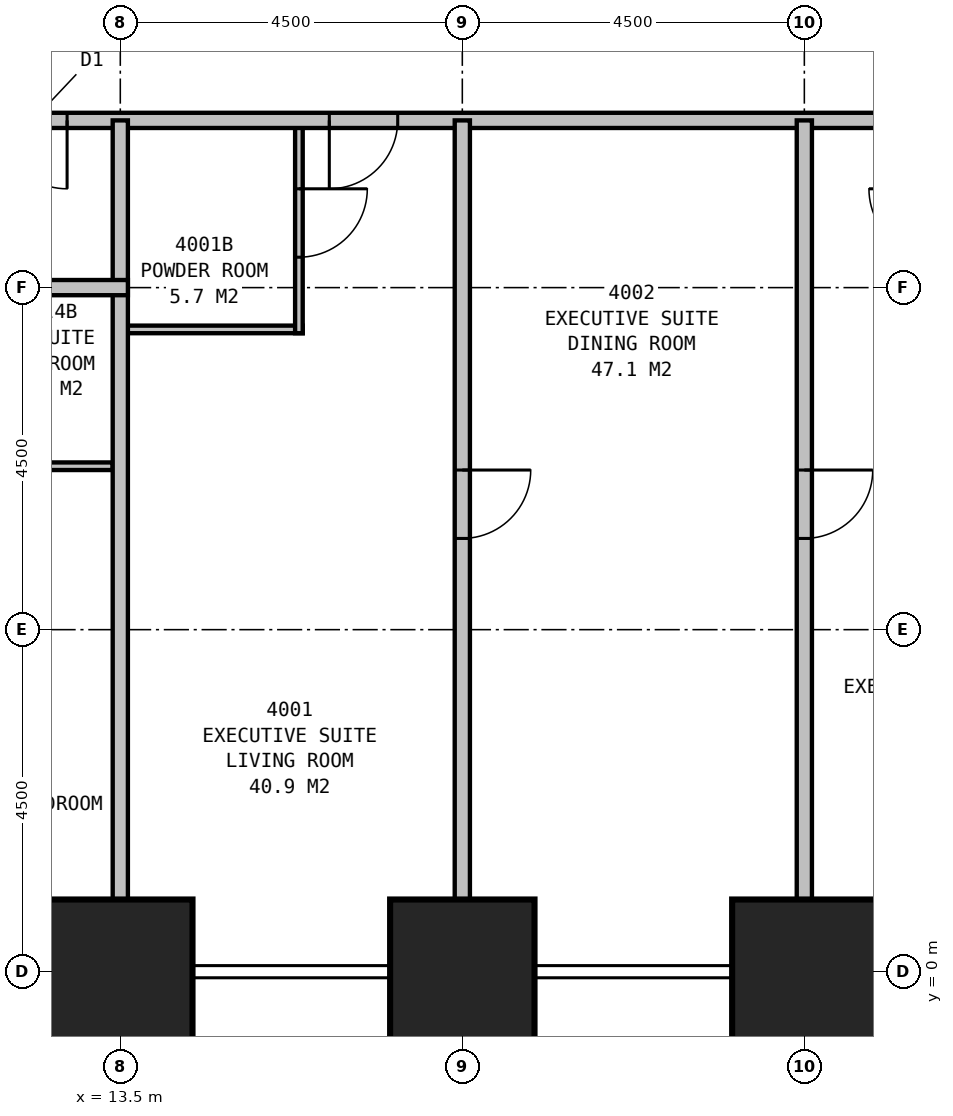
"""IFC4 building model, lengths in metres.
Left out: names, types, materials, properties, quantities, classifications, styles, units other than length and angle.
Written with IfcOpenShell. Run it as: python <this file> out.ifc"""

import sys

from ifc_helpers import new_model, si_unit, direction, frame, frame_2d, origin, origin_2d, place, context, subcontext, project, spatial, rectangle, extrude, element, fill, save


model = new_model("IFC4")
c1 = context("Model", 3, precision=1e-05, world=origin(), true_north=direction((0.0, 1.0)))
c2 = subcontext(c1, "Body", "Model", "MODEL_VIEW")
j1 = project(units=[si_unit("LENGTHUNIT", "METRE"), si_unit("PLANEANGLEUNIT", "RADIAN")], contexts=[c1])
p1 = place(None, origin())
s1 = spatial("IfcSite", under=j1, at=p1, CompositionType="ELEMENT")
p2 = place(p1, origin())
s2 = spatial("IfcBuilding", under=s1, at=p2, CompositionType="ELEMENT")
p3 = place(p2, frame((0.0, 0.0, 157.9)))
s3 = spatial("IfcBuildingStorey", under=s2, at=p3, CompositionType="ELEMENT", Elevation=157.9)
for number, where, z_axis, x_axis in (
    (1, (13.5, 0.0, 0.0), (0.0, 0.0, 1.0), (1.0, 0.0, 0.0)),
    (2, (18.0, 0.0, 0.0), (0.0, 0.0, 1.0), (1.0, 0.0, 0.0)),
    (3, (22.5, 0.0, 0.0), (0.0, 0.0, 1.0), (1.0, 0.0, 0.0)),
):
    element("IfcColumn", number, at=place(p3, frame(where, z_axis=z_axis, x_axis=x_axis)), inside=s3, PredefinedType="COLUMN", context=c2, shape_type="SweptSolid", body=[
        extrude(rectangle(XDim=1.9, YDim=1.9, at=origin_2d()), origin(), (0.0, 0.0, 1.0), 4.5),
    ])
p4 = place(p3, frame((11.2, 11.2, 0.0), z_axis=(0.0, 0.0, 1.0), x_axis=(1.0, 0.0, 0.0)))
e4 = element("IfcWall", 4, at=p4, inside=s3, PredefinedType="PARTITIONING", context=c2, shape_type="SweptSolid", body=[
    extrude(rectangle(XDim=27.1, YDim=0.2, at=frame_2d((13.55, 0.0))), origin(), (0.0, 0.0, 1.0), 4.25),
])
p5 = place(p4, frame((5.95, 0.0, 0.0), z_axis=(0.0, 0.0, 1.0), x_axis=(-1.0, 0.0, 0.0)))
e5 = element("IfcOpeningElement", 5, at=p5, cuts=e4, PredefinedType="OPENING", context=c2, shape_type="SweptSolid", body=[
    extrude(rectangle(XDim=0.9, YDim=2.1, at=frame_2d((0.45, 1.05))), frame((0.0, 0.11, 0.0), z_axis=(0.0, -1.0, 0.0), x_axis=(1.0, 0.0, 0.0)), (0.0, 0.0, 1.0), 0.22),
])
p6 = place(p4, frame((19.95, 0.0, 0.0), z_axis=(0.0, 0.0, 1.0), x_axis=(-1.0, 0.0, 0.0)))
e6 = element("IfcOpeningElement", 6, at=p6, cuts=e4, PredefinedType="OPENING", context=c2, shape_type="SweptSolid", body=[
    extrude(rectangle(XDim=1.0, YDim=2.1, at=frame_2d((0.5, 1.05))), frame((0.0, 0.11, 0.0), z_axis=(0.0, -1.0, 0.0), x_axis=(1.0, 0.0, 0.0)), (0.0, 0.0, 1.0), 0.22),
])
p7 = place(p4, frame((24.35, 0.0, 0.0), z_axis=(0.0, 0.0, 1.0), x_axis=(-1.0, 0.0, 0.0)))
e7 = element("IfcOpeningElement", 7, at=p7, cuts=e4, PredefinedType="OPENING", context=c2, shape_type="SweptSolid", body=[
    extrude(rectangle(XDim=0.9, YDim=2.1, at=frame_2d((0.45, 1.05))), frame((0.0, 0.11, 0.0), z_axis=(0.0, -1.0, 0.0), x_axis=(1.0, 0.0, 0.0)), (0.0, 0.0, 1.0), 0.22),
])
p8 = place(p4, frame((1.6, 0.0, 0.0), z_axis=(0.0, 0.0, 1.0), x_axis=(-1.0, 0.0, 0.0)))
e8 = element("IfcOpeningElement", 8, at=p8, cuts=e4, PredefinedType="OPENING", context=c2, shape_type="SweptSolid", body=[
    extrude(rectangle(XDim=0.9, YDim=2.1, at=frame_2d((0.45, 1.05))), frame((0.0, 0.11, 0.0), z_axis=(0.0, -1.0, 0.0), x_axis=(1.0, 0.0, 0.0)), (0.0, 0.0, 1.0), 0.22),
])
p9 = place(p4, frame((26.4, 0.0, 0.0), z_axis=(0.0, 0.0, 1.0), x_axis=(-1.0, 0.0, 0.0)))
e9 = element("IfcOpeningElement", 9, at=p9, cuts=e4, PredefinedType="OPENING", context=c2, shape_type="SweptSolid", body=[
    extrude(rectangle(XDim=0.9, YDim=2.1, at=frame_2d((0.45, 1.05))), frame((0.0, 0.11, 0.0), z_axis=(0.0, -1.0, 0.0), x_axis=(1.0, 0.0, 0.0)), (0.0, 0.0, 1.0), 0.22),
])
p10 = place(p3, frame((18.0, 11.2, 0.0), z_axis=(0.0, 0.0, 1.0), x_axis=(0.0, -1.0, 0.0)))
e10 = element("IfcWall", 10, at=p10, inside=s3, PredefinedType="PARTITIONING", context=c2, shape_type="SweptSolid", body=[
    extrude(rectangle(XDim=11.2, YDim=0.2, at=frame_2d((5.6, 0.0))), origin(), (0.0, 0.0, 1.0), 3.25),
])
p11 = place(p10, frame((4.6, 0.0, 0.0)))
e11 = element("IfcOpeningElement", 11, at=p11, cuts=e10, PredefinedType="OPENING", context=c2, shape_type="SweptSolid", body=[
    extrude(rectangle(XDim=0.9, YDim=2.1, at=frame_2d((0.45, 1.05))), frame((0.0, 0.11, 0.0), z_axis=(0.0, -1.0, 0.0), x_axis=(1.0, 0.0, 0.0)), (0.0, 0.0, 1.0), 0.22),
])
p12 = place(p3, frame((22.5, 11.2, 0.0), z_axis=(0.0, 0.0, 1.0), x_axis=(0.0, -1.0, 0.0)))
e12 = element("IfcWall", 12, at=p12, inside=s3, PredefinedType="PARTITIONING", context=c2, shape_type="SweptSolid", body=[
    extrude(rectangle(XDim=11.2, YDim=0.2, at=frame_2d((5.6, 0.0))), origin(), (0.0, 0.0, 1.0), 3.25),
])
p13 = place(p12, frame((4.6, 0.0, 0.0)))
e13 = element("IfcOpeningElement", 13, at=p13, cuts=e12, PredefinedType="OPENING", context=c2, shape_type="SweptSolid", body=[
    extrude(rectangle(XDim=0.9, YDim=2.1, at=frame_2d((0.45, 1.05))), frame((0.0, 0.11, 0.0), z_axis=(0.0, -1.0, 0.0), x_axis=(1.0, 0.0, 0.0)), (0.0, 0.0, 1.0), 0.22),
])
p14 = place(p3, frame((13.5, 8.45, 0.0), z_axis=(0.0, 0.0, 1.0), x_axis=(1.0, 0.0, 0.0)))
e14 = element("IfcWall", 14, at=p14, inside=s3, PredefinedType="PLUMBINGWALL", context=c2, shape_type="SweptSolid", body=[
    extrude(rectangle(XDim=2.4, YDim=0.1, at=frame_2d((1.2, 0.0))), origin(), (0.0, 0.0, 1.0), 4.25),
])
p15 = place(p3, frame((15.85, 11.2, 0.0), z_axis=(0.0, 0.0, 1.0), x_axis=(0.0, -1.0, 0.0)))
e15 = element("IfcWall", 15, at=p15, inside=s3, PredefinedType="PLUMBINGWALL", context=c2, shape_type="SweptSolid", body=[
    extrude(rectangle(XDim=2.8, YDim=0.1, at=frame_2d((1.4, 0.0))), origin(), (0.0, 0.0, 1.0), 4.25),
])
p16 = place(p15, frame((0.9, 0.0, 0.0)))
e16 = element("IfcOpeningElement", 16, at=p16, cuts=e15, PredefinedType="OPENING", context=c2, shape_type="SweptSolid", body=[
    extrude(rectangle(XDim=0.9, YDim=2.1, at=frame_2d((0.45, 1.05))), frame((0.0, 0.06, 0.0), z_axis=(0.0, -1.0, 0.0), x_axis=(1.0, 0.0, 0.0)), (0.0, 0.0, 1.0), 0.12),
])
p17 = place(p3, frame((13.5, 11.2, 0.0), z_axis=(0.0, 0.0, 1.0), x_axis=(0.0, -1.0, 0.0)))
e17 = element("IfcWall", 17, at=p17, inside=s3, PredefinedType="PARTITIONING", context=c2, shape_type="SweptSolid", body=[
    extrude(rectangle(XDim=11.2, YDim=0.2, at=frame_2d((5.6, 0.0))), origin(), (0.0, 0.0, 1.0), 3.25),
])
p18 = place(p3, frame((13.6, 9.0, 0.0), z_axis=(0.0, 0.0, 1.0), x_axis=(-1.0, 0.0, 0.0)))
e18 = element("IfcWall", 18, at=p18, inside=s3, PredefinedType="PARTITIONING", context=c2, shape_type="SweptSolid", body=[
    extrude(rectangle(XDim=4.6, YDim=0.2, at=frame_2d((2.3, 0.0))), origin(), (0.0, 0.0, 1.0), 4.25),
])
p19 = place(p18, frame((2.3, 0.0, 0.0)))
e19 = element("IfcOpeningElement", 19, at=p19, cuts=e18, PredefinedType="OPENING", context=c2, shape_type="SweptSolid", body=[
    extrude(rectangle(XDim=0.9, YDim=2.1, at=frame_2d((0.45, 1.05))), frame((0.0, 0.11, 0.0), z_axis=(0.0, -1.0, 0.0), x_axis=(1.0, 0.0, 0.0)), (0.0, 0.0, 1.0), 0.22),
])
p20 = place(p3, frame((13.4, 6.65, 0.0), z_axis=(0.0, 0.0, 1.0), x_axis=(-1.0, 0.0, 0.0)))
e20 = element("IfcWall", 20, at=p20, inside=s3, PredefinedType="PLUMBINGWALL", context=c2, shape_type="SweptSolid", body=[
    extrude(rectangle(XDim=2.1, YDim=0.1, at=frame_2d((1.05, 0.0))), origin(), (0.0, 0.0, 1.0), 4.25),
])
p21 = place(p20, frame((0.9, 0.0, 0.0)))
e21 = element("IfcOpeningElement", 21, at=p21, cuts=e20, PredefinedType="OPENING", context=c2, shape_type="SweptSolid", body=[
    extrude(rectangle(XDim=0.9, YDim=2.1, at=frame_2d((0.45, 1.05))), frame((0.0, 0.06, 0.0), z_axis=(0.0, -1.0, 0.0), x_axis=(1.0, 0.0, 0.0)), (0.0, 0.0, 1.0), 0.12),
])
p22 = place(p5, origin())
e22 = element("IfcDoor", 22, at=p22, inside=s3, OperationType="SINGLE_SWING_RIGHT", PredefinedType="DOOR", context=c2, shape_type="SweptSolid", body=[
    extrude(rectangle(XDim=0.9, YDim=2.1, at=frame_2d((0.45, 1.05))), frame((0.0, 0.025, 0.0), z_axis=(0.0, -1.0, 0.0), x_axis=(1.0, 0.0, 0.0)), (0.0, 0.0, 1.0), 0.05),
])
fill(e5, e22)
p23 = place(p8, origin())
e23 = element("IfcDoor", 23, at=p23, inside=s3, OperationType="SINGLE_SWING_LEFT", PredefinedType="DOOR", context=c2, shape_type="SweptSolid", body=[
    extrude(rectangle(XDim=0.9, YDim=2.1, at=frame_2d((0.45, 1.05))), frame((0.0, 0.025, 0.0), z_axis=(0.0, -1.0, 0.0), x_axis=(1.0, 0.0, 0.0)), (0.0, 0.0, 1.0), 0.05),
])
fill(e8, e23)
p24 = place(p11, origin())
e24 = element("IfcDoor", 24, at=p24, inside=s3, OperationType="SINGLE_SWING_LEFT", PredefinedType="DOOR", context=c2, shape_type="SweptSolid", body=[
    extrude(rectangle(XDim=0.9, YDim=2.1, at=frame_2d((0.45, 1.05))), frame((0.0, 0.025, 0.0), z_axis=(0.0, -1.0, 0.0), x_axis=(1.0, 0.0, 0.0)), (0.0, 0.0, 1.0), 0.05),
])
fill(e11, e24)
p25 = place(p13, origin())
e25 = element("IfcDoor", 25, at=p25, inside=s3, OperationType="SINGLE_SWING_LEFT", PredefinedType="DOOR", context=c2, shape_type="SweptSolid", body=[
    extrude(rectangle(XDim=0.9, YDim=2.1, at=frame_2d((0.45, 1.05))), frame((0.0, 0.025, 0.0), z_axis=(0.0, -1.0, 0.0), x_axis=(1.0, 0.0, 0.0)), (0.0, 0.0, 1.0), 0.05),
])
fill(e13, e25)
p26 = place(p16, origin())
e26 = element("IfcDoor", 26, at=p26, inside=s3, OperationType="SINGLE_SWING_LEFT", PredefinedType="DOOR", context=c2, shape_type="SweptSolid", body=[
    extrude(rectangle(XDim=0.9, YDim=2.1, at=frame_2d((0.45, 1.05))), frame((0.0, 0.025, 0.0), z_axis=(0.0, -1.0, 0.0), x_axis=(1.0, 0.0, 0.0)), (0.0, 0.0, 1.0), 0.05),
])
fill(e16, e26)
save(model, sys.argv[1])
